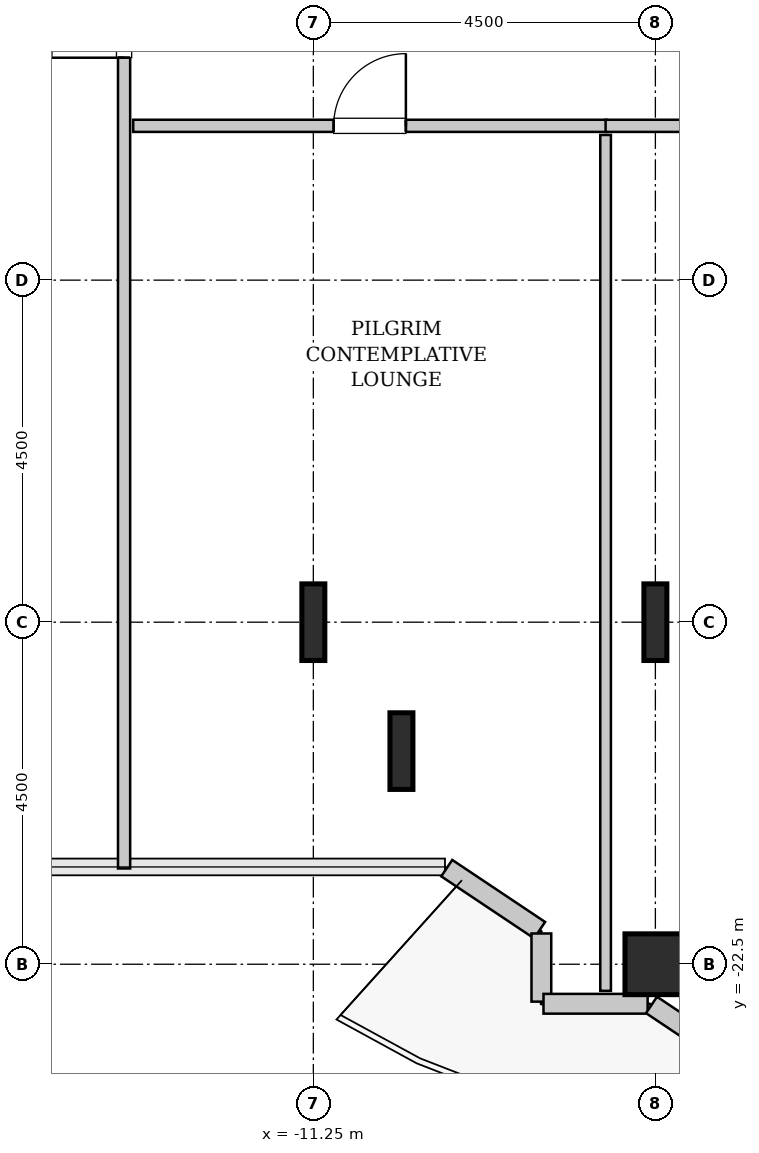
"""IFC4 building model, lengths in metres.
Left out: names, types, materials, properties, quantities, classifications, styles, units other than length and angle.
Written with IfcOpenShell. Run it as: python <this file> out.ifc"""

import sys

from ifc_helpers import new_model, si_unit, direction, frame, frame_2d, origin, origin_2d, place, context, subcontext, project, spatial, rectangle, hollow_rectangle, i_section, extrude, source, transform, mapped, element, fill, save


model = new_model("IFC4")
c1 = context("Model", 3, precision=1e-05, world=origin(), true_north=direction((0.0, 1.0)))
c2 = subcontext(c1, "Body", "Model", "MODEL_VIEW")
j1 = project(units=[si_unit("LENGTHUNIT", "METRE"), si_unit("PLANEANGLEUNIT", "RADIAN")], contexts=[c1])
p1 = place(None, origin())
s1 = spatial("IfcSite", under=j1, at=p1, CompositionType="ELEMENT")
p2 = place(p1, origin())
s2 = spatial("IfcBuilding", under=s1, at=p2, CompositionType="ELEMENT")
p3 = place(p2, frame((0.0, 0.0, 125.0)))
s3 = spatial("IfcBuildingStorey", under=s2, at=p3, CompositionType="ELEMENT", Elevation=125.0)
m1 = source(origin(), c2, "Body", "SweptSolid", [
    extrude(i_section(OverallWidth=0.302, OverallDepth=1.008, WebThickness=0.021, FlangeThickness=0.04, FilletRadius=0.03, at=origin_2d()), origin(), (0.0, 0.0, 1.0), 3.8),
])
for number, where, z_axis, x_axis in (
    (1, (-11.25, -18.0, 0.0), (0.0, 0.0, 1.0), (1.0, 0.0, 0.0)),
    (2, (-10.091, -19.696, 0.0), (0.0, 0.0, 1.0), (1.0, 0.0, 0.0)),
):
    element("IfcColumn", number, at=place(p3, frame(where, z_axis=z_axis, x_axis=x_axis)), inside=s3, PredefinedType="COLUMN", context=c2, shape_type="MappedRepresentation", body=[
        mapped(m1, transform((0.0, 0.0, 0.0), x_axis=(1.0, 0.0, 0.0), y_axis=(0.0, 1.0, 0.0), z_axis=(0.0, 0.0, 1.0), scale=1.0)),
    ])
m2 = source(origin(), c2, "Body", "SweptSolid", [
    extrude(hollow_rectangle(XDim=0.8, YDim=0.8, WallThickness=0.04, InnerFilletRadius=0.04, OuterFilletRadius=0.08, at=origin_2d()), origin(), (0.0, 0.0, 1.0), 3.8),
])
p4 = place(p3, frame((-6.75, -22.5, 0.0), z_axis=(0.0, 0.0, 1.0), x_axis=(1.0, 0.0, 0.0)))
e3 = element("IfcColumn", 3, at=p4, inside=s3, PredefinedType="COLUMN", context=c2, shape_type="MappedRepresentation", body=[
    mapped(m2, transform((0.0, 0.0, 0.0), x_axis=(1.0, 0.0, 0.0), y_axis=(0.0, 1.0, 0.0), z_axis=(0.0, 0.0, 1.0), scale=1.0)),
])
p5 = place(p3, frame((-6.75, -18.0, 0.0), z_axis=(0.0, 0.0, 1.0), x_axis=(1.0, 0.0, 0.0)))
e4 = element("IfcColumn", 4, at=p5, inside=s3, PredefinedType="COLUMN", context=c2, shape_type="MappedRepresentation", body=[
    mapped(m1, transform((0.0, 0.0, 0.0), x_axis=(1.0, 0.0, 0.0), y_axis=(0.0, 1.0, 0.0), z_axis=(0.0, 0.0, 1.0), scale=1.0)),
])
m3 = source(origin(), c2, "Body", "SweptSolid", [
    extrude(rectangle(XDim=1.469, YDim=0.26, at=frame_2d((0.734, 0.0))), origin(), (0.0, 0.0, 1.0), 3.55),
])
p6 = place(p3, frame((-9.495, -21.236, 0.0), z_axis=(0.0, 0.0, 1.0), x_axis=(0.831461760506, -0.555581983884, 0.0)))
e5 = element("IfcWall", 5, at=p6, inside=s3, PredefinedType="SOLIDWALL", context=c2, shape_type="MappedRepresentation", body=[
    mapped(m3, transform((0.0, 0.0, 0.0), x_axis=(1.0, 0.0, 0.0), y_axis=(0.0, 1.0, 0.0), z_axis=(0.0, 0.0, 1.0), scale=1.0)),
])
m4 = source(origin(), c2, "Body", "SweptSolid", [
    extrude(rectangle(XDim=0.897, YDim=0.26, at=frame_2d((0.448, 0.0))), origin(), (0.0, 0.0, 1.0), 3.55),
])
p7 = place(p3, frame((-8.25, -22.095, 0.0), z_axis=(0.0, 0.0, 1.0), x_axis=(0.0, -1.0, 0.0)))
e6 = element("IfcWall", 6, at=p7, inside=s3, PredefinedType="SOLIDWALL", context=c2, shape_type="MappedRepresentation", body=[
    mapped(m4, transform((0.0, 0.0, 0.0), x_axis=(1.0, 0.0, 0.0), y_axis=(0.0, 1.0, 0.0), z_axis=(0.0, 0.0, 1.0), scale=1.0)),
])
m5 = source(origin(), c2, "Body", "SweptSolid", [
    extrude(rectangle(XDim=1.37, YDim=0.26, at=frame_2d((0.685, 0.0))), origin(), (0.0, 0.0, 1.0), 3.55),
])
p8 = place(p3, frame((-8.222, -23.02, 0.0), z_axis=(0.0, 0.0, 1.0), x_axis=(1.0, 0.0, 0.0)))
e7 = element("IfcWall", 7, at=p8, inside=s3, PredefinedType="SOLIDWALL", context=c2, shape_type="MappedRepresentation", body=[
    mapped(m5, transform((0.0, 0.0, 0.0), x_axis=(1.0, 0.0, 0.0), y_axis=(0.0, 1.0, 0.0), z_axis=(0.0, 0.0, 1.0), scale=1.0)),
])
m6 = source(origin(), c2, "Body", "SweptSolid", [
    extrude(rectangle(XDim=0.565, YDim=0.26, at=frame_2d((0.283, 0.0))), origin(), (0.0, 0.0, 1.0), 3.55),
])
p9 = place(p3, frame((-6.801, -23.036, 0.0), z_axis=(0.0, 0.0, 1.0), x_axis=(0.831651492666, -0.555297933317, 0.0)))
e8 = element("IfcWall", 8, at=p9, inside=s3, PredefinedType="SOLIDWALL", context=c2, shape_type="MappedRepresentation", body=[
    mapped(m6, transform((0.0, 0.0, 0.0), x_axis=(1.0, 0.0, 0.0), y_axis=(0.0, 1.0, 0.0), z_axis=(0.0, 0.0, 1.0), scale=1.0)),
])
m7 = source(origin(), c2, "Body", "SweptSolid", [
    extrude(rectangle(XDim=12.552, YDim=0.16, at=frame_2d((6.276, 0.0))), origin(), (0.0, 0.0, 1.0), 3.535),
])
p10 = place(p3, frame((-13.74, -21.24, 0.0), z_axis=(0.0, 0.0, 1.0), x_axis=(0.0, 1.0, 0.0)))
e9 = element("IfcWall", 9, at=p10, inside=s3, PredefinedType="PARTITIONING", context=c2, shape_type="MappedRepresentation", body=[
    mapped(m7, transform((0.0, 0.0, 0.0), x_axis=(1.0, 0.0, 0.0), y_axis=(0.0, 1.0, 0.0), z_axis=(0.0, 0.0, 1.0), scale=1.0)),
])
p11 = place(p10, frame((10.666, 0.0, 0.0)))
e10 = element("IfcOpeningElement", 10, at=p11, cuts=e9, PredefinedType="OPENING", context=c2, shape_type="SweptSolid", body=[
    extrude(rectangle(XDim=0.95, YDim=2.1, at=frame_2d((0.475, 1.05))), frame((0.0, 0.09, 0.0), z_axis=(0.0, -1.0, 0.0), x_axis=(1.0, 0.0, 0.0)), (0.0, 0.0, 1.0), 0.18),
])
m8 = source(origin(), c2, "Body", "SweptSolid", [
    extrude(rectangle(XDim=6.225, YDim=0.16, at=frame_2d((3.113, 0.0))), origin(), (0.0, 0.0, 1.0), 3.535),
])
p12 = place(p3, frame((-13.62, -11.47, 0.0), z_axis=(0.0, 0.0, 1.0), x_axis=(1.0, 0.0, 0.0)))
e11 = element("IfcWall", 11, at=p12, inside=s3, PredefinedType="PARTITIONING", context=c2, shape_type="MappedRepresentation", body=[
    mapped(m8, transform((0.0, 0.0, 0.0), x_axis=(1.0, 0.0, 0.0), y_axis=(0.0, 1.0, 0.0), z_axis=(0.0, 0.0, 1.0), scale=1.0)),
])
p13 = place(p12, frame((2.637, 0.0, 0.0)))
e12 = element("IfcOpeningElement", 12, at=p13, cuts=e11, PredefinedType="OPENING", context=c2, shape_type="SweptSolid", body=[
    extrude(rectangle(XDim=0.95, YDim=2.1, at=frame_2d((0.475, 1.05))), frame((0.0, 0.09, 0.0), z_axis=(0.0, -1.0, 0.0), x_axis=(1.0, 0.0, 0.0)), (0.0, 0.0, 1.0), 0.18),
])
m9 = source(origin(), c2, "Body", "SweptSolid", [
    extrude(rectangle(XDim=11.26, YDim=0.14, at=frame_2d((5.63, 0.0))), origin(), (0.0, 0.0, 1.0), 3.535),
])
p14 = place(p3, frame((-7.405, -22.85, 0.0), z_axis=(0.0, 0.0, 1.0), x_axis=(0.0, 1.0, 0.0)))
e13 = element("IfcWall", 13, at=p14, inside=s3, PredefinedType="PARTITIONING", context=c2, shape_type="MappedRepresentation", body=[
    mapped(m9, transform((0.0, 0.0, 0.0), x_axis=(1.0, 0.0, 0.0), y_axis=(0.0, 1.0, 0.0), z_axis=(0.0, 0.0, 1.0), scale=1.0)),
])
m10 = source(origin(), c2, "Body", "SweptSolid", [
    extrude(rectangle(XDim=6.105, YDim=0.16, at=frame_2d((3.052, 0.0))), origin(), (0.0, 0.0, 1.0), 3.535),
])
p15 = place(p3, frame((-7.405, -11.47, 0.0), z_axis=(0.0, 0.0, 1.0), x_axis=(1.0, 0.0, 0.0)))
e14 = element("IfcWall", 14, at=p15, inside=s3, PredefinedType="PARTITIONING", context=c2, shape_type="MappedRepresentation", body=[
    mapped(m10, transform((0.0, 0.0, 0.0), x_axis=(1.0, 0.0, 0.0), y_axis=(0.0, 1.0, 0.0), z_axis=(0.0, 0.0, 1.0), scale=1.0)),
])
p16 = place(p15, frame((2.577, 0.0, 0.0)))
e15 = element("IfcOpeningElement", 15, at=p16, cuts=e14, PredefinedType="OPENING", context=c2, shape_type="SweptSolid", body=[
    extrude(rectangle(XDim=0.95, YDim=2.1, at=frame_2d((0.475, 1.05))), frame((0.0, 0.09, 0.0), z_axis=(0.0, -1.0, 0.0), x_axis=(1.0, 0.0, 0.0)), (0.0, 0.0, 1.0), 0.18),
])
m11 = source(origin(), c2, "Body", "SweptSolid", [
    extrude(rectangle(XDim=0.95, YDim=2.1, at=frame_2d((0.475, 1.05))), frame((0.0, 0.025, 0.0), z_axis=(0.0, -1.0, 0.0), x_axis=(1.0, 0.0, 0.0)), (0.0, 0.0, 1.0), 0.05),
])
p17 = place(p11, origin())
e16 = element("IfcDoor", 16, at=p17, inside=s3, OperationType="SINGLE_SWING_LEFT", PredefinedType="DOOR", context=c2, shape_type="MappedRepresentation", body=[
    mapped(m11, transform((0.0, 0.0, 0.0), x_axis=(1.0, 0.0, 0.0), y_axis=(0.0, 1.0, 0.0), z_axis=(0.0, 0.0, 1.0), scale=1.0)),
])
fill(e10, e16)
p18 = place(p13, origin())
e17 = element("IfcDoor", 17, at=p18, inside=s3, OperationType="SINGLE_SWING_RIGHT", PredefinedType="DOOR", context=c2, shape_type="MappedRepresentation", body=[
    mapped(m11, transform((0.0, 0.0, 0.0), x_axis=(1.0, 0.0, 0.0), y_axis=(0.0, 1.0, 0.0), z_axis=(0.0, 0.0, 1.0), scale=1.0)),
])
fill(e12, e17)
save(model, sys.argv[1])
